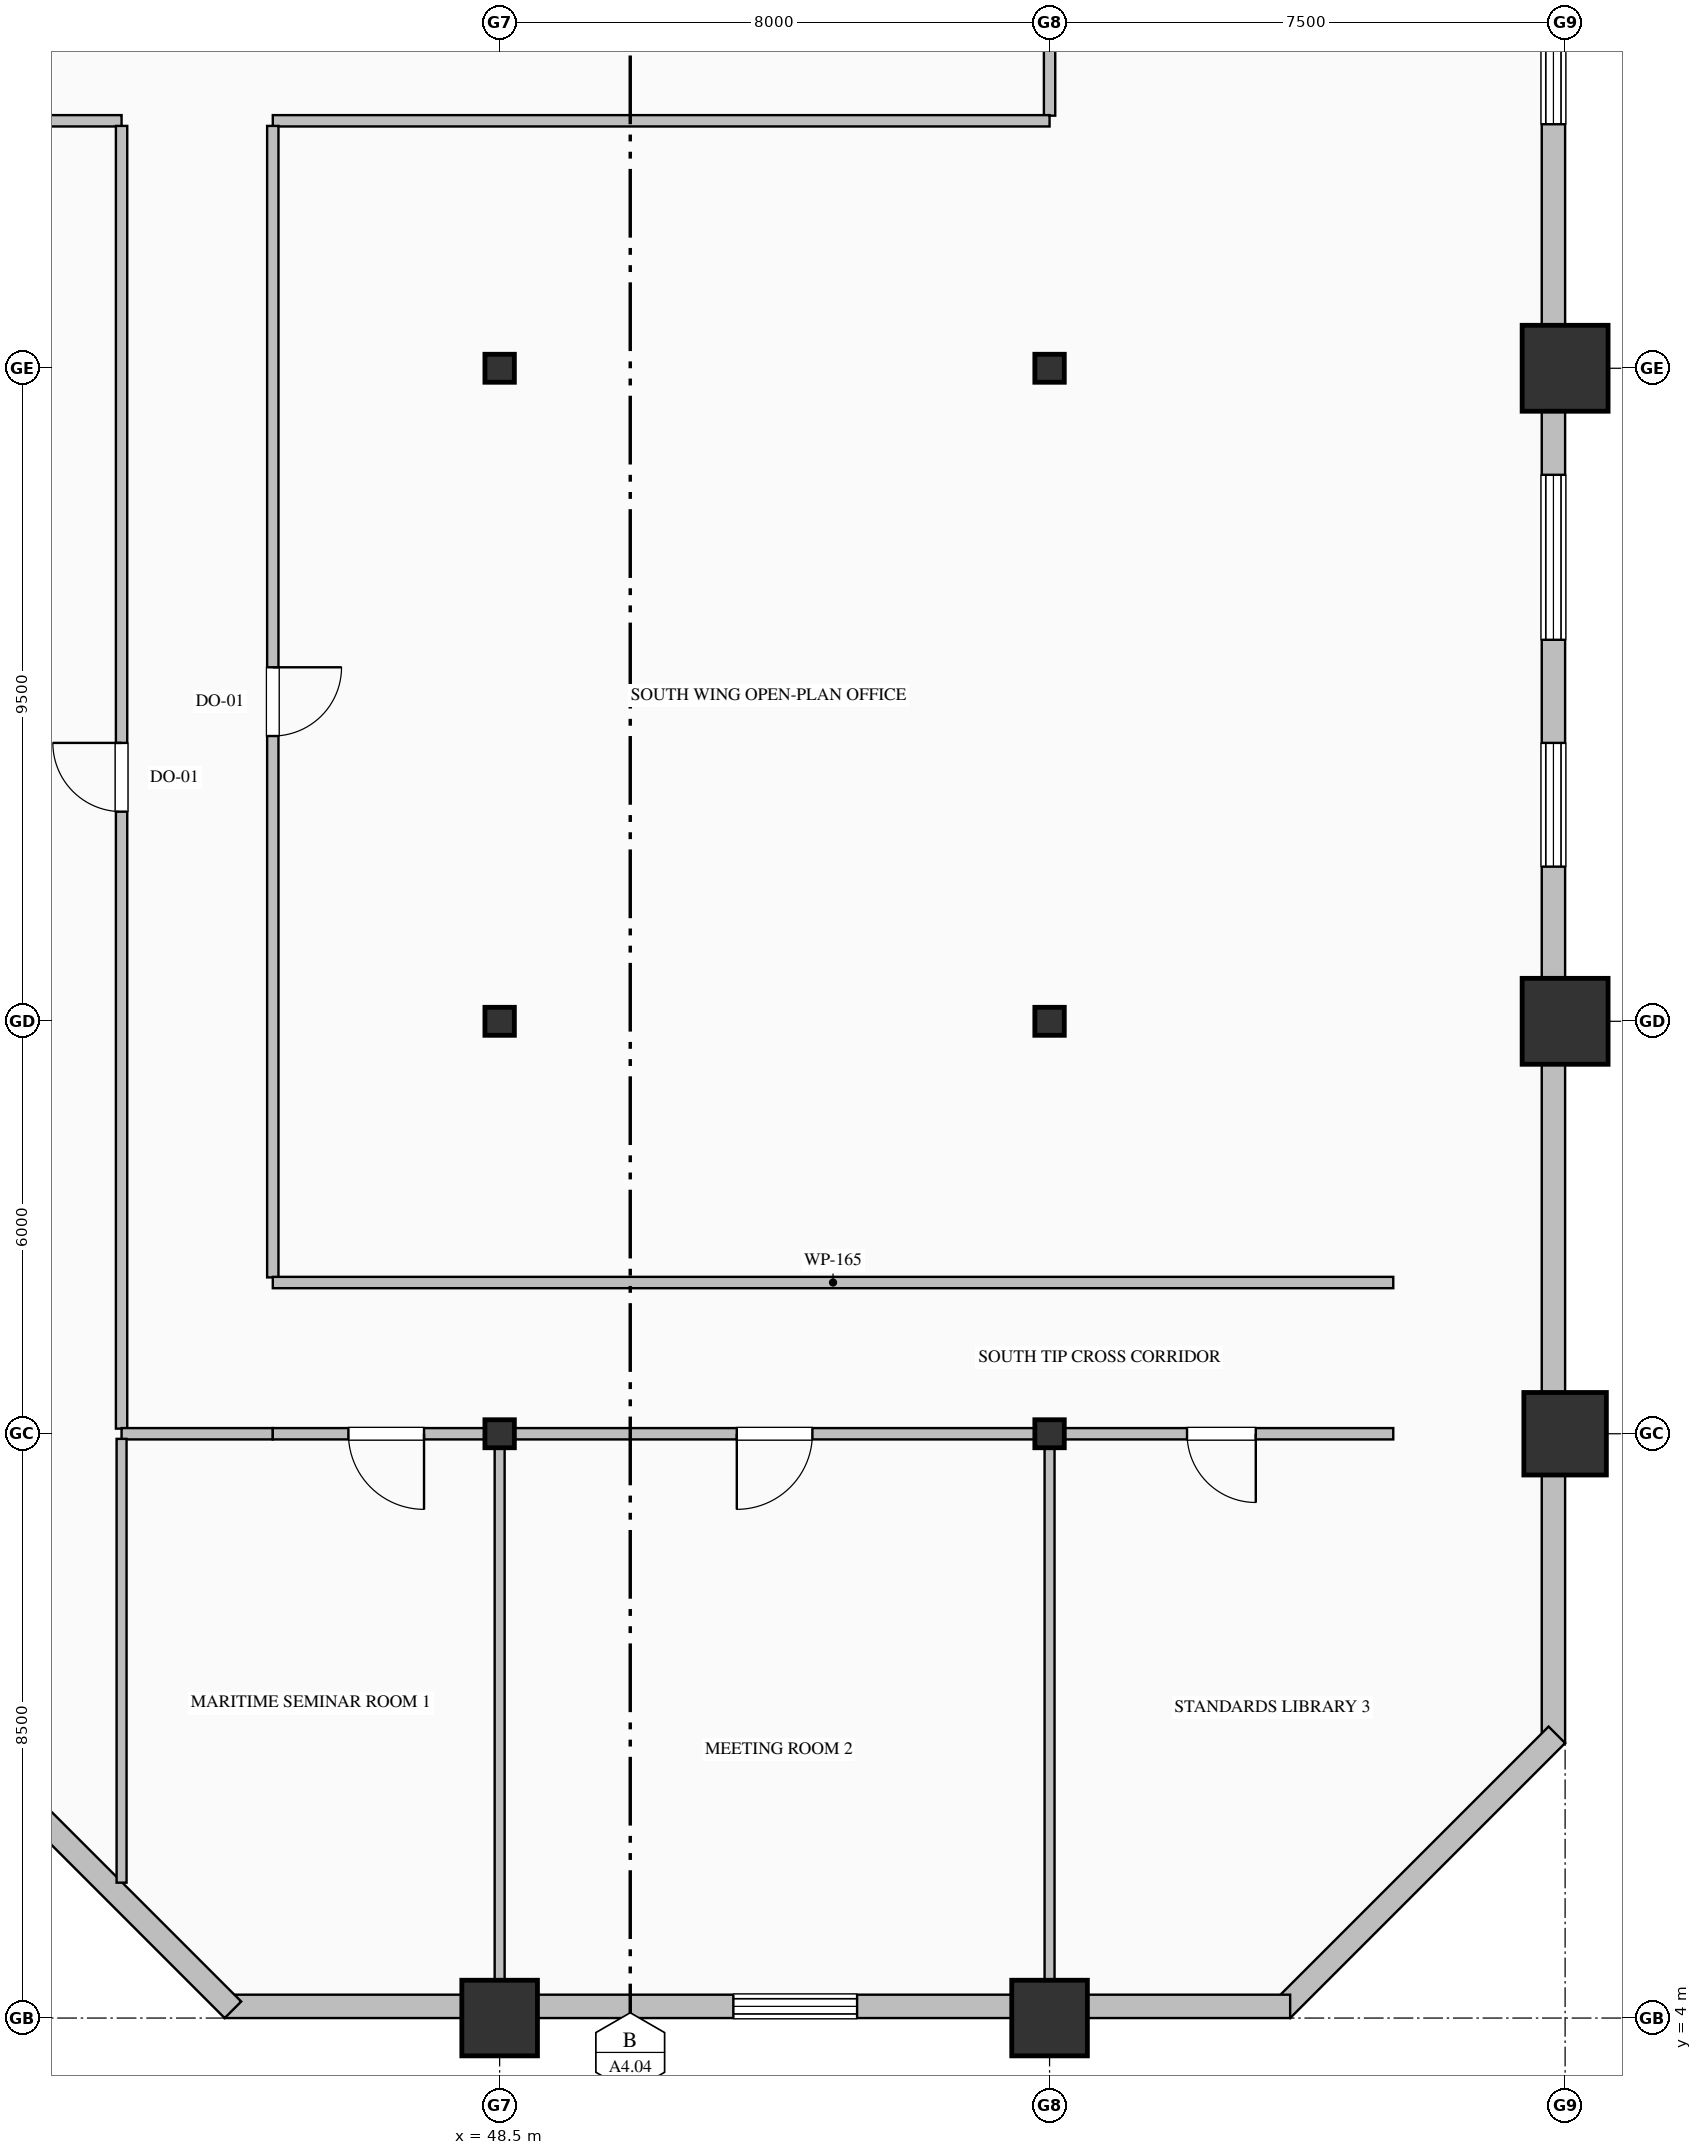
"""IFC4 building model, lengths in metres.
Left out: names, types, materials, properties, quantities, classifications, styles, units other than length and angle.
Written with IfcOpenShell. Run it as: python <this file> out.ifc"""

import sys

from ifc_helpers import new_model, si_unit, direction, frame, frame_2d, origin, origin_2d, place, context, subcontext, project, spatial, rectangle, hollow_rectangle, hollow_circle, i_section, extrude, element, fill, save


model = new_model("IFC4")
c1 = context("Model", 3, precision=1e-05, world=origin(), true_north=direction((0.0, 1.0)))
c2 = subcontext(c1, "Body", "Model", "MODEL_VIEW")
j1 = project(units=[si_unit("LENGTHUNIT", "METRE"), si_unit("PLANEANGLEUNIT", "RADIAN")], contexts=[c1])
p1 = place(None, origin())
s1 = spatial("IfcSite", under=j1, at=p1, CompositionType="ELEMENT")
p2 = place(p1, origin())
s2 = spatial("IfcBuilding", under=s1, at=p2, CompositionType="ELEMENT")
p3 = place(p2, frame((0.0, 0.0, 52.2)))
s3 = spatial("IfcBuildingStorey", under=s2, at=p3, CompositionType="ELEMENT", Elevation=52.2)
p4 = place(p3, frame((48.5, 4.0, 0.0), z_axis=(0.0, 0.0, 1.0), x_axis=(1.0, 0.0, 0.0)))
e1 = element("IfcColumn", 1, at=p4, inside=s3, PredefinedType="COLUMN", context=c2, shape_type="SweptSolid", body=[
    extrude(hollow_rectangle(XDim=1.1, YDim=1.1, WallThickness=0.04, at=origin_2d()), origin(), (0.0, 0.0, 1.0), 4.0),
])
for number, where, z_axis, x_axis in (
    (2, (48.5, 12.5, 0.0), (0.0, 0.0, 1.0), (1.0, 0.0, 0.0)),
    (3, (48.5, 18.5, 0.0), (0.0, 0.0, 1.0), (1.0, 0.0, 0.0)),
    (4, (48.5, 28.0, 0.0), (0.0, 0.0, 1.0), (1.0, 0.0, 0.0)),
):
    element("IfcColumn", number, at=place(p3, frame(where, z_axis=z_axis, x_axis=x_axis)), inside=s3, PredefinedType="COLUMN", context=c2, shape_type="SweptSolid", body=[
        extrude(i_section(OverallWidth=0.407, OverallDepth=0.428, WebThickness=0.02, FlangeThickness=0.035, FilletRadius=0.022, at=origin_2d()), origin(), (0.0, 0.0, 1.0), 4.0),
    ])
p5 = place(p3, frame((56.5, 4.0, 0.0), z_axis=(0.0, 0.0, 1.0), x_axis=(1.0, 0.0, 0.0)))
e5 = element("IfcColumn", 5, at=p5, inside=s3, PredefinedType="COLUMN", context=c2, shape_type="SweptSolid", body=[
    extrude(hollow_rectangle(XDim=1.1, YDim=1.1, WallThickness=0.04, at=origin_2d()), origin(), (0.0, 0.0, 1.0), 4.0),
])
for number, where, z_axis, x_axis in (
    (6, (56.5, 12.5, 0.0), (0.0, 0.0, 1.0), (1.0, 0.0, 0.0)),
    (7, (56.5, 18.5, 0.0), (0.0, 0.0, 1.0), (1.0, 0.0, 0.0)),
    (8, (56.5, 28.0, 0.0), (0.0, 0.0, 1.0), (1.0, 0.0, 0.0)),
):
    element("IfcColumn", number, at=place(p3, frame(where, z_axis=z_axis, x_axis=x_axis)), inside=s3, PredefinedType="COLUMN", context=c2, shape_type="SweptSolid", body=[
        extrude(i_section(OverallWidth=0.407, OverallDepth=0.428, WebThickness=0.02, FlangeThickness=0.035, FilletRadius=0.022, at=origin_2d()), origin(), (0.0, 0.0, 1.0), 4.0),
    ])
p6 = place(p3, frame((64.0, 12.5, 0.0), z_axis=(0.0, 0.0, 1.0), x_axis=(1.0, 0.0, 0.0)))
e9 = element("IfcColumn", 9, at=p6, inside=s3, PredefinedType="COLUMN", context=c2, shape_type="SweptSolid", body=[
    extrude(hollow_circle(Radius=0.6, WallThickness=0.04, at=origin_2d()), origin(), (0.0, 0.0, 1.0), 4.0),
])
for number, where, z_axis, x_axis in (
    (10, (64.0, 18.5, 0.0), (0.0, 0.0, 1.0), (1.0, 0.0, 0.0)),
    (11, (64.0, 28.0, 0.0), (0.0, 0.0, 1.0), (1.0, 0.0, 0.0)),
):
    element("IfcColumn", number, at=place(p3, frame(where, z_axis=z_axis, x_axis=x_axis)), inside=s3, PredefinedType="COLUMN", context=c2, shape_type="SweptSolid", body=[
        extrude(hollow_rectangle(XDim=1.25, YDim=1.25, WallThickness=0.045, at=origin_2d()), origin(), (0.0, 0.0, 1.0), 4.0),
    ])
p7 = place(p3, frame((63.83, 36.05, 0.0), z_axis=(0.0, 0.0, 1.0), x_axis=(0.0, -1.0, 0.0)))
e12 = element("IfcWall", 12, at=p7, inside=s3, PredefinedType="SOLIDWALL", context=c2, shape_type="SweptSolid", body=[
    extrude(rectangle(XDim=28.05, YDim=0.34, at=frame_2d((14.025, 0.0))), origin(), (0.0, 0.0, 1.0), 3.25),
])
p8 = place(p7, frame((2.7, 0.0, 0.85)))
e13 = element("IfcOpeningElement", 13, at=p8, cuts=e12, PredefinedType="OPENING", context=c2, shape_type="SweptSolid", body=[
    extrude(rectangle(XDim=1.8, YDim=2.05, at=frame_2d((0.9, 1.025))), frame((0.0, 0.18, 0.0), z_axis=(0.0, -1.0, 0.0), x_axis=(1.0, 0.0, 0.0)), (0.0, 0.0, 1.0), 0.36),
])
p9 = place(p7, frame((9.6, 0.0, 0.8)))
e14 = element("IfcOpeningElement", 14, at=p9, cuts=e12, PredefinedType="OPENING", context=c2, shape_type="SweptSolid", body=[
    extrude(rectangle(XDim=2.4, YDim=2.15, at=frame_2d((1.2, 1.075))), frame((0.0, 0.18, 0.0), z_axis=(0.0, -1.0, 0.0), x_axis=(1.0, 0.0, 0.0)), (0.0, 0.0, 1.0), 0.36),
])
p10 = place(p7, frame((13.5, 0.0, 0.85)))
e15 = element("IfcOpeningElement", 15, at=p10, cuts=e12, PredefinedType="OPENING", context=c2, shape_type="SweptSolid", body=[
    extrude(rectangle(XDim=1.8, YDim=2.05, at=frame_2d((0.9, 1.025))), frame((0.0, 0.18, 0.0), z_axis=(0.0, -1.0, 0.0), x_axis=(1.0, 0.0, 0.0)), (0.0, 0.0, 1.0), 0.36),
])
p11 = place(p3, frame((63.88, 8.12, 0.0), z_axis=(0.0, 0.0, 1.0), x_axis=(-0.707106781187, -0.707106781187, 0.0)))
e16 = element("IfcWall", 16, at=p11, inside=s3, PredefinedType="SOLIDWALL", context=c2, shape_type="SweptSolid", body=[
    extrude(rectangle(XDim=5.657, YDim=0.34, at=frame_2d((2.828, 0.0))), origin(), (0.0, 0.0, 1.0), 3.75),
])
p12 = place(p3, frame((60.0, 4.17, 0.0), z_axis=(0.0, 0.0, 1.0), x_axis=(-1.0, 0.0, 0.0)))
e17 = element("IfcWall", 17, at=p12, inside=s3, PredefinedType="SOLIDWALL", context=c2, shape_type="SweptSolid", body=[
    extrude(rectangle(XDim=15.5, YDim=0.34, at=frame_2d((7.75, 0.0))), origin(), (0.0, 0.0, 1.0), 3.25),
])
p13 = place(p12, frame((6.3, 0.0, 0.85)))
e18 = element("IfcOpeningElement", 18, at=p13, cuts=e17, PredefinedType="OPENING", context=c2, shape_type="SweptSolid", body=[
    extrude(rectangle(XDim=1.8, YDim=2.05, at=frame_2d((0.9, 1.025))), frame((0.0, 0.18, 0.0), z_axis=(0.0, -1.0, 0.0), x_axis=(1.0, 0.0, 0.0)), (0.0, 0.0, 1.0), 0.36),
])
p14 = place(p3, frame((44.62, 4.12, 0.0), z_axis=(0.0, 0.0, 1.0), x_axis=(-0.707106781187, 0.707106781187, 0.0)))
e19 = element("IfcWall", 19, at=p14, inside=s3, PredefinedType="SOLIDWALL", context=c2, shape_type="SweptSolid", body=[
    extrude(rectangle(XDim=5.657, YDim=0.34, at=frame_2d((2.828, 0.0))), origin(), (0.0, 0.0, 1.0), 3.75),
])
p15 = place(p3, frame((56.5, 33.726, 0.0), z_axis=(0.0, 0.0, 1.0), x_axis=(0.0, -1.0, 0.0)))
e20 = element("IfcWall", 20, at=p15, inside=s3, PredefinedType="PARTITIONING", context=c2, shape_type="SweptSolid", body=[
    extrude(rectangle(XDim=2.051, YDim=0.165, at=frame_2d((1.025, 0.0))), origin(), (0.0, 0.0, 1.0), 3.042),
])
p16 = place(p3, frame((56.5, 31.6, 0.0), z_axis=(0.0, 0.0, 1.0), x_axis=(-1.0, 0.0, 0.0)))
e21 = element("IfcWall", 21, at=p16, inside=s3, PredefinedType="PARTITIONING", context=c2, shape_type="SweptSolid", body=[
    extrude(rectangle(XDim=11.3, YDim=0.165, at=frame_2d((5.65, 0.0))), origin(), (0.0, 0.0, 1.0), 3.75),
])
p17 = place(p3, frame((43.0, 31.6, 0.0), z_axis=(0.0, 0.0, 1.0), x_axis=(-1.0, 0.0, 0.0)))
e22 = element("IfcWall", 22, at=p17, inside=s3, PredefinedType="PARTITIONING", context=c2, shape_type="SweptSolid", body=[
    extrude(rectangle(XDim=2.5, YDim=0.165, at=frame_2d((1.25, 0.0))), origin(), (0.0, 0.0, 1.0), 3.75),
])
p18 = place(p3, frame((45.2, 31.525, 0.0), z_axis=(0.0, 0.0, 1.0), x_axis=(0.0, -1.0, 0.0)))
e23 = element("IfcWall", 23, at=p18, inside=s3, PredefinedType="PARTITIONING", context=c2, shape_type="SweptSolid", body=[
    extrude(rectangle(XDim=16.751, YDim=0.165, at=frame_2d((8.375, 0.0))), origin(), (0.0, 0.0, 1.0), 3.75),
])
p19 = place(p18, frame((7.875, 0.0, 0.0)))
e24 = element("IfcOpeningElement", 24, at=p19, cuts=e23, PredefinedType="OPENING", context=c2, shape_type="SweptSolid", body=[
    extrude(rectangle(XDim=1.0, YDim=2.15, at=frame_2d((0.5, 1.075))), frame((0.0, 0.093, 0.0), z_axis=(0.0, -1.0, 0.0), x_axis=(1.0, 0.0, 0.0)), (0.0, 0.0, 1.0), 0.185),
])
p20 = place(p3, frame((43.0, 12.574, 0.0), z_axis=(0.0, 0.0, 1.0), x_axis=(0.0, 1.0, 0.0)))
e25 = element("IfcWall", 25, at=p20, inside=s3, PredefinedType="PARTITIONING", context=c2, shape_type="SweptSolid", body=[
    extrude(rectangle(XDim=18.951, YDim=0.165, at=frame_2d((9.476, 0.0))), origin(), (0.0, 0.0, 1.0), 3.75),
])
p21 = place(p20, frame((8.976, 0.0, 0.0)))
e26 = element("IfcOpeningElement", 26, at=p21, cuts=e25, PredefinedType="OPENING", context=c2, shape_type="SweptSolid", body=[
    extrude(rectangle(XDim=1.0, YDim=2.15, at=frame_2d((0.5, 1.075))), frame((0.0, 0.093, 0.0), z_axis=(0.0, -1.0, 0.0), x_axis=(1.0, 0.0, 0.0)), (0.0, 0.0, 1.0), 0.185),
])
p22 = place(p3, frame((45.2, 12.5, 0.0), z_axis=(0.0, 0.0, 1.0), x_axis=(-1.0, 0.0, 0.0)))
e27 = element("IfcWall", 27, at=p22, inside=s3, PredefinedType="PARTITIONING", context=c2, shape_type="SweptSolid", body=[
    extrude(rectangle(XDim=2.2, YDim=0.165, at=frame_2d((1.1, 0.0))), origin(), (0.0, 0.0, 1.0), 3.042),
])
p23 = place(p3, frame((45.2, 14.7, 0.0), z_axis=(0.0, 0.0, 1.0), x_axis=(1.0, 0.0, 0.0)))
e28 = element("IfcWall", 28, at=p23, inside=s3, PredefinedType="PARTITIONING", context=c2, shape_type="SweptSolid", body=[
    extrude(rectangle(XDim=16.3, YDim=0.165, at=frame_2d((8.15, 0.0))), origin(), (0.0, 0.0, 1.0), 3.75),
])
p24 = place(p3, frame((48.5, 12.5, 0.0), z_axis=(0.0, 0.0, 1.0), x_axis=(-1.0, 0.0, 0.0)))
e29 = element("IfcWall", 29, at=p24, inside=s3, PredefinedType="PARTITIONING", context=c2, shape_type="SweptSolid", body=[
    extrude(rectangle(XDim=3.3, YDim=0.165, at=frame_2d((1.65, 0.0))), origin(), (0.0, 0.0, 1.0), 3.042),
])
p25 = place(p24, frame((1.1, 0.0, 0.0)))
e30 = element("IfcOpeningElement", 30, at=p25, cuts=e29, PredefinedType="OPENING", context=c2, shape_type="SweptSolid", body=[
    extrude(rectangle(XDim=1.1, YDim=2.2, at=frame_2d((0.55, 1.1))), frame((0.0, 0.093, 0.0), z_axis=(0.0, -1.0, 0.0), x_axis=(1.0, 0.0, 0.0)), (0.0, 0.0, 1.0), 0.185),
])
p26 = place(p3, frame((56.5, 12.5, 0.0), z_axis=(0.0, 0.0, 1.0), x_axis=(-1.0, 0.0, 0.0)))
e31 = element("IfcWall", 31, at=p26, inside=s3, PredefinedType="PARTITIONING", context=c2, shape_type="SweptSolid", body=[
    extrude(rectangle(XDim=8.0, YDim=0.165, at=frame_2d((4.0, 0.0))), origin(), (0.0, 0.0, 1.0), 3.042),
])
p27 = place(p26, frame((3.45, 0.0, 0.0)))
e32 = element("IfcOpeningElement", 32, at=p27, cuts=e31, PredefinedType="OPENING", context=c2, shape_type="SweptSolid", body=[
    extrude(rectangle(XDim=1.1, YDim=2.2, at=frame_2d((0.55, 1.1))), frame((0.0, 0.093, 0.0), z_axis=(0.0, -1.0, 0.0), x_axis=(1.0, 0.0, 0.0)), (0.0, 0.0, 1.0), 0.185),
])
p28 = place(p3, frame((61.5, 12.5, 0.0), z_axis=(0.0, 0.0, 1.0), x_axis=(-1.0, 0.0, 0.0)))
e33 = element("IfcWall", 33, at=p28, inside=s3, PredefinedType="PARTITIONING", context=c2, shape_type="SweptSolid", body=[
    extrude(rectangle(XDim=5.0, YDim=0.165, at=frame_2d((2.5, 0.0))), origin(), (0.0, 0.0, 1.0), 3.042),
])
p29 = place(p28, frame((2.0, 0.0, 0.0)))
e34 = element("IfcOpeningElement", 34, at=p29, cuts=e33, PredefinedType="OPENING", context=c2, shape_type="SweptSolid", body=[
    extrude(rectangle(XDim=1.0, YDim=2.15, at=frame_2d((0.5, 1.075))), frame((0.0, 0.093, 0.0), z_axis=(0.0, -1.0, 0.0), x_axis=(1.0, 0.0, 0.0)), (0.0, 0.0, 1.0), 0.185),
])
p30 = place(p3, frame((43.0, 12.426, 0.0), z_axis=(0.0, 0.0, 1.0), x_axis=(0.0, -1.0, 0.0)))
e35 = element("IfcWall", 35, at=p30, inside=s3, PredefinedType="PARTITIONING", context=c2, shape_type="SweptSolid", body=[
    extrude(rectangle(XDim=6.456, YDim=0.145, at=frame_2d((3.228, 0.0))), origin(), (0.0, 0.0, 1.0), 3.75),
])
for number, where, z_axis, x_axis in (
    (36, (48.5, 12.426, 0.0), (0.0, 0.0, 1.0), (0.0, -1.0, 0.0)),
    (37, (56.5, 12.426, 0.0), (0.0, 0.0, 1.0), (0.0, -1.0, 0.0)),
):
    element("IfcWall", number, at=place(p3, frame(where, z_axis=z_axis, x_axis=x_axis)), inside=s3, PredefinedType="PARTITIONING", context=c2, shape_type="SweptSolid", body=[
        extrude(rectangle(XDim=8.094, YDim=0.145, at=frame_2d((4.047, 0.0))), origin(), (0.0, 0.0, 1.0), 3.042),
    ])
p31 = place(p8, origin())
e38 = element("IfcWindow", 38, at=p31, inside=s3, PartitioningType="TRIPLE_PANEL_VERTICAL", PredefinedType="WINDOW", context=c2, shape_type="SweptSolid", body=[
    extrude(rectangle(XDim=1.8, YDim=2.05, at=frame_2d((0.9, 1.025))), frame((0.0, 0.15, 0.0), z_axis=(0.0, -1.0, 0.0), x_axis=(1.0, 0.0, 0.0)), (0.0, 0.0, 1.0), 0.06),
])
fill(e13, e38)
p32 = place(p9, origin())
e39 = element("IfcWindow", 39, at=p32, inside=s3, PartitioningType="TRIPLE_PANEL_VERTICAL", PredefinedType="WINDOW", context=c2, shape_type="SweptSolid", body=[
    extrude(rectangle(XDim=2.4, YDim=2.15, at=frame_2d((1.2, 1.075))), frame((0.0, 0.15, 0.0), z_axis=(0.0, -1.0, 0.0), x_axis=(1.0, 0.0, 0.0)), (0.0, 0.0, 1.0), 0.06),
])
fill(e14, e39)
p33 = place(p10, origin())
e40 = element("IfcWindow", 40, at=p33, inside=s3, PartitioningType="TRIPLE_PANEL_VERTICAL", PredefinedType="WINDOW", context=c2, shape_type="SweptSolid", body=[
    extrude(rectangle(XDim=1.8, YDim=2.05, at=frame_2d((0.9, 1.025))), frame((0.0, 0.15, 0.0), z_axis=(0.0, -1.0, 0.0), x_axis=(1.0, 0.0, 0.0)), (0.0, 0.0, 1.0), 0.06),
])
fill(e15, e40)
p34 = place(p13, origin())
e41 = element("IfcWindow", 41, at=p34, inside=s3, PartitioningType="TRIPLE_PANEL_VERTICAL", PredefinedType="WINDOW", context=c2, shape_type="SweptSolid", body=[
    extrude(rectangle(XDim=1.8, YDim=2.05, at=frame_2d((0.9, 1.025))), frame((0.0, 0.15, 0.0), z_axis=(0.0, -1.0, 0.0), x_axis=(1.0, 0.0, 0.0)), (0.0, 0.0, 1.0), 0.06),
])
fill(e18, e41)
p35 = place(p19, origin())
e42 = element("IfcDoor", 42, at=p35, inside=s3, OperationType="SINGLE_SWING_LEFT", PredefinedType="DOOR", context=c2, shape_type="SweptSolid", body=[
    extrude(rectangle(XDim=1.0, YDim=2.15, at=frame_2d((0.5, 1.075))), frame((0.0, 0.025, 0.0), z_axis=(0.0, -1.0, 0.0), x_axis=(1.0, 0.0, 0.0)), (0.0, 0.0, 1.0), 0.05),
])
fill(e24, e42)
p36 = place(p21, origin())
e43 = element("IfcDoor", 43, at=p36, inside=s3, OperationType="SINGLE_SWING_RIGHT", PredefinedType="DOOR", context=c2, shape_type="SweptSolid", body=[
    extrude(rectangle(XDim=1.0, YDim=2.15, at=frame_2d((0.5, 1.075))), frame((0.0, 0.025, 0.0), z_axis=(0.0, -1.0, 0.0), x_axis=(1.0, 0.0, 0.0)), (0.0, 0.0, 1.0), 0.05),
])
fill(e26, e43)
p37 = place(p25, origin())
e44 = element("IfcDoor", 44, at=p37, inside=s3, OperationType="SINGLE_SWING_LEFT", PredefinedType="DOOR", context=c2, shape_type="SweptSolid", body=[
    extrude(rectangle(XDim=1.1, YDim=2.2, at=frame_2d((0.55, 1.1))), frame((0.0, 0.025, 0.0), z_axis=(0.0, -1.0, 0.0), x_axis=(1.0, 0.0, 0.0)), (0.0, 0.0, 1.0), 0.05),
])
fill(e30, e44)
p38 = place(p27, origin())
e45 = element("IfcDoor", 45, at=p38, inside=s3, OperationType="SINGLE_SWING_RIGHT", PredefinedType="DOOR", context=c2, shape_type="SweptSolid", body=[
    extrude(rectangle(XDim=1.1, YDim=2.2, at=frame_2d((0.55, 1.1))), frame((0.0, 0.025, 0.0), z_axis=(0.0, -1.0, 0.0), x_axis=(1.0, 0.0, 0.0)), (0.0, 0.0, 1.0), 0.05),
])
fill(e32, e45)
p39 = place(p29, origin())
e46 = element("IfcDoor", 46, at=p39, inside=s3, OperationType="SINGLE_SWING_LEFT", PredefinedType="DOOR", context=c2, shape_type="SweptSolid", body=[
    extrude(rectangle(XDim=1.0, YDim=2.15, at=frame_2d((0.5, 1.075))), frame((0.0, 0.025, 0.0), z_axis=(0.0, -1.0, 0.0), x_axis=(1.0, 0.0, 0.0)), (0.0, 0.0, 1.0), 0.05),
])
fill(e34, e46)
save(model, sys.argv[1])
